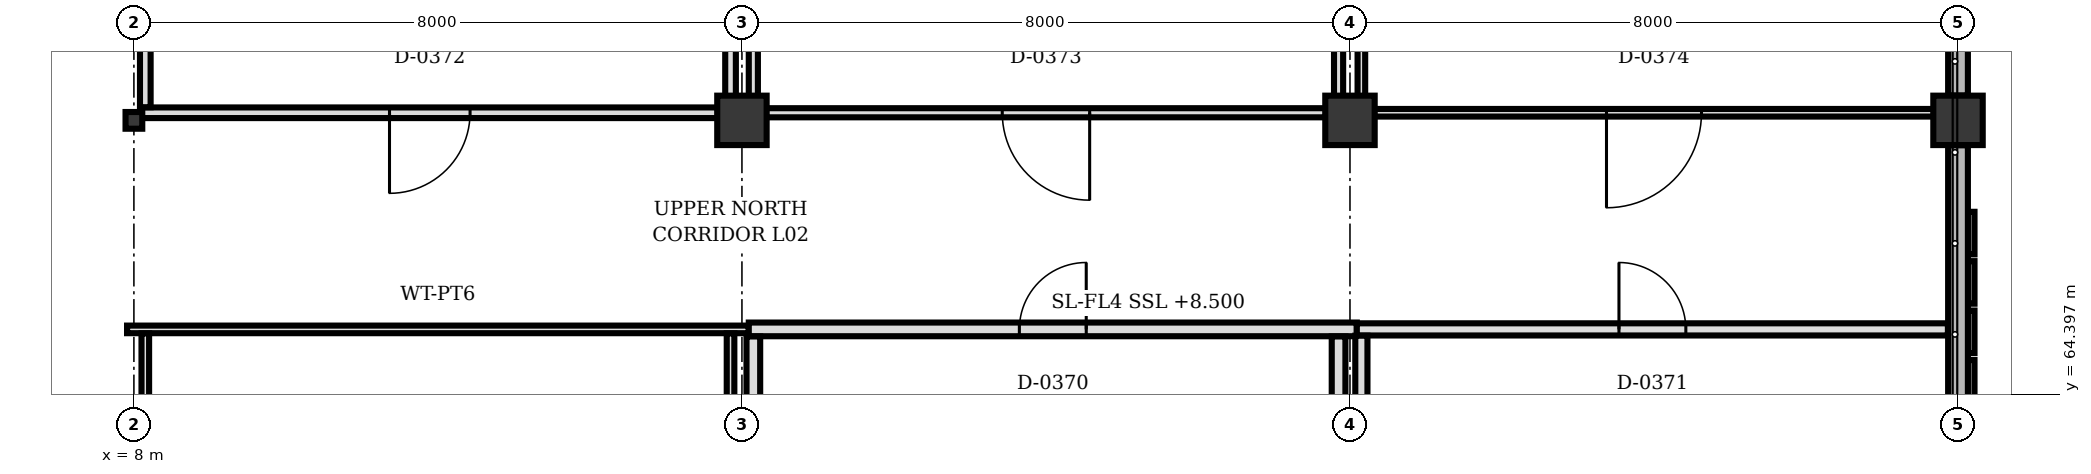
"""IFC4 building model, lengths in metres.
Left out: names, types, materials, properties, quantities, classifications, styles, units other than length and angle.
Written with IfcOpenShell. Run it as: python <this file> out.ifc"""

import sys

from ifc_helpers import new_model, si_unit, direction, frame, frame_2d, origin, origin_2d, place, context, subcontext, project, spatial, rectangle, hollow_rectangle, extrude, element, fill, save


model = new_model("IFC4")
c1 = context("Model", 3, precision=1e-05, world=origin(), true_north=direction((0.0, 1.0)))
c2 = subcontext(c1, "Body", "Model", "MODEL_VIEW")
j1 = project(units=[si_unit("LENGTHUNIT", "METRE"), si_unit("PLANEANGLEUNIT", "RADIAN")], contexts=[c1])
p1 = place(None, origin())
s1 = spatial("IfcSite", under=j1, at=p1, CompositionType="ELEMENT")
p2 = place(p1, origin())
s2 = spatial("IfcBuilding", under=s1, at=p2, CompositionType="ELEMENT")
p3 = place(p2, frame((0.0, 0.0, 8.5)))
s3 = spatial("IfcBuildingStorey", under=s2, at=p3, CompositionType="ELEMENT", Elevation=8.5)
for number, where, z_axis, x_axis in (
    (1, (16.0, 68.0, 0.0), (0.0, 0.0, 1.0), (1.0, 0.0, 0.0)),
    (2, (24.0, 68.0, 0.0), (0.0, 0.0, 1.0), (1.0, 0.0, 0.0)),
    (3, (32.0, 68.0, 0.0), (0.0, 0.0, 1.0), (1.0, 0.0, 0.0)),
):
    element("IfcColumn", number, at=place(p3, frame(where, z_axis=z_axis, x_axis=x_axis)), inside=s3, PredefinedType="COLUMN", context=c2, shape_type="SweptSolid", body=[
        extrude(rectangle(XDim=0.65, YDim=0.65, at=origin_2d()), origin(), (0.0, 0.0, 1.0), 4.0),
    ])
p4 = place(p3, frame((8.0, 68.0, 0.0), z_axis=(0.0, 0.0, 1.0), x_axis=(1.0, 0.0, 0.0)))
e4 = element("IfcColumn", 4, at=p4, inside=s3, PredefinedType="COLUMN", context=c2, shape_type="SweptSolid", body=[
    extrude(hollow_rectangle(XDim=0.22, YDim=0.22, WallThickness=0.01, at=origin_2d()), origin(), (0.0, 0.0, 1.0), 4.0),
])
p5 = place(p3, frame((32.0, 75.673, 0.0), z_axis=(0.0, 0.0, 1.0), x_axis=(0.0, -1.0, 0.0)))
e5 = element("IfcWall", 5, at=p5, inside=s3, PredefinedType="SOLIDWALL", context=c2, shape_type="SweptSolid", body=[
    extrude(rectangle(XDim=7.346, YDim=0.26, at=frame_2d((3.673, 0.0))), origin(), (0.0, 0.0, 1.0), 3.152),
])
p6 = place(p5, frame((4.889, 0.0, 0.9)))
e6 = element("IfcOpeningElement", 6, at=p6, cuts=e5, PredefinedType="OPENING", context=c2, shape_type="SweptSolid", body=[
    extrude(rectangle(XDim=0.8, YDim=1.1, at=frame_2d((0.4, 0.55))), frame((0.0, 0.14, 0.0), z_axis=(0.0, -1.0, 0.0), x_axis=(1.0, 0.0, 0.0)), (0.0, 0.0, 1.0), 0.28),
])
p7 = place(p3, frame((32.0, 67.673, 0.0), z_axis=(0.0, 0.0, 1.0), x_axis=(0.0, -1.0, 0.0)))
e7 = element("IfcWall", 7, at=p7, inside=s3, PredefinedType="SOLIDWALL", context=c2, shape_type="SweptSolid", body=[
    extrude(rectangle(XDim=5.561, YDim=0.26, at=frame_2d((2.781, 0.0))), origin(), (0.0, 0.0, 1.0), 3.002),
])
p8 = place(p3, frame((7.91, 65.25, 0.0), z_axis=(0.0, 0.0, 1.0), x_axis=(1.0, 0.0, 0.0)))
e8 = element("IfcWall", 8, at=p8, inside=s3, PredefinedType="PARTITIONING", context=c2, shape_type="SweptSolid", body=[
    extrude(rectangle(XDim=8.18, YDim=0.1, at=frame_2d((4.09, 0.0))), origin(), (0.0, 0.0, 1.0), 3.152),
])
p9 = place(p3, frame((15.85, 65.197, 0.0), z_axis=(0.0, 0.0, 1.0), x_axis=(0.0, -1.0, 0.0)))
e9 = element("IfcWall", 9, at=p9, inside=s3, PredefinedType="PARTITIONING", context=c2, shape_type="SweptSolid", body=[
    extrude(rectangle(XDim=2.88, YDim=0.1, at=frame_2d((1.44, 0.0))), origin(), (0.0, 0.0, 1.0), 3.002),
])
p10 = place(p3, frame((8.15, 58.26, 0.0), z_axis=(0.0, 0.0, 1.0), x_axis=(0.0, 1.0, 0.0)))
e10 = element("IfcWall", 10, at=p10, inside=s3, PredefinedType="PARTITIONING", context=c2, shape_type="SweptSolid", body=[
    extrude(rectangle(XDim=6.937, YDim=0.1, at=frame_2d((3.469, 0.0))), origin(), (0.0, 0.0, 1.0), 3.002),
])
p11 = place(p10, frame((2.474, 0.0, 0.0)))
e11 = element("IfcOpeningElement", 11, at=p11, cuts=e10, PredefinedType="OPENING", context=c2, shape_type="SweptSolid", body=[
    extrude(rectangle(XDim=0.88, YDim=2.1, at=frame_2d((0.44, 1.05))), frame((0.0, 0.06, 0.0), z_axis=(0.0, -1.0, 0.0), x_axis=(1.0, 0.0, 0.0)), (0.0, 0.0, 1.0), 0.12),
])
p12 = place(p3, frame((16.09, 65.25, 0.0), z_axis=(0.0, 0.0, 1.0), x_axis=(1.0, 0.0, 0.0)))
e12 = element("IfcWall", 12, at=p12, inside=s3, PredefinedType="PARTITIONING", context=c2, shape_type="SweptSolid", body=[
    extrude(rectangle(XDim=8.0, YDim=0.18, at=frame_2d((4.0, 0.0))), origin(), (0.0, 0.0, 1.0), 3.152),
])
p13 = place(p12, frame((3.56, 0.0, 0.0)))
e13 = element("IfcOpeningElement", 13, at=p13, cuts=e12, PredefinedType="OPENING", context=c2, shape_type="SweptSolid", body=[
    extrude(rectangle(XDim=0.88, YDim=2.1, at=frame_2d((0.44, 1.05))), frame((0.0, 0.1, 0.0), z_axis=(0.0, -1.0, 0.0), x_axis=(1.0, 0.0, 0.0)), (0.0, 0.0, 1.0), 0.2),
])
for number, where, z_axis, x_axis in (
    (14, (23.85, 65.157, 0.0), (0.0, 0.0, 1.0), (0.0, -1.0, 0.0)),
    (15, (16.15, 62.317, 0.0), (0.0, 0.0, 1.0), (0.0, 1.0, 0.0)),
):
    element("IfcWall", number, at=place(p3, frame(where, z_axis=z_axis, x_axis=x_axis)), inside=s3, PredefinedType="PARTITIONING", context=c2, shape_type="SweptSolid", body=[
        extrude(rectangle(XDim=2.84, YDim=0.18, at=frame_2d((1.42, 0.0))), origin(), (0.0, 0.0, 1.0), 3.002),
    ])
p14 = place(p3, frame((24.09, 65.25, 0.0), z_axis=(0.0, 0.0, 1.0), x_axis=(1.0, 0.0, 0.0)))
e16 = element("IfcWall", 16, at=p14, inside=s3, PredefinedType="PARTITIONING", context=c2, shape_type="SweptSolid", body=[
    extrude(rectangle(XDim=7.777, YDim=0.16, at=frame_2d((3.888, 0.0))), origin(), (0.0, 0.0, 1.0), 3.152),
])
p15 = place(p14, frame((3.449, 0.0, 0.0)))
e17 = element("IfcOpeningElement", 17, at=p15, cuts=e16, PredefinedType="OPENING", context=c2, shape_type="SweptSolid", body=[
    extrude(rectangle(XDim=0.88, YDim=2.1, at=frame_2d((0.44, 1.05))), frame((0.0, 0.09, 0.0), z_axis=(0.0, -1.0, 0.0), x_axis=(1.0, 0.0, 0.0)), (0.0, 0.0, 1.0), 0.18),
])
p16 = place(p3, frame((24.15, 62.317, 0.0), z_axis=(0.0, 0.0, 1.0), x_axis=(0.0, 1.0, 0.0)))
e18 = element("IfcWall", 18, at=p16, inside=s3, PredefinedType="PARTITIONING", context=c2, shape_type="SweptSolid", body=[
    extrude(rectangle(XDim=2.85, YDim=0.16, at=frame_2d((1.425, 0.0))), origin(), (0.0, 0.0, 1.0), 3.002),
])
p17 = place(p3, frame((15.85, 75.683, 0.0), z_axis=(0.0, 0.0, 1.0), x_axis=(0.0, -1.0, 0.0)))
e19 = element("IfcWall", 19, at=p17, inside=s3, PredefinedType="PARTITIONING", context=c2, shape_type="SweptSolid", body=[
    extrude(rectangle(XDim=7.366, YDim=0.14, at=frame_2d((3.683, 0.0))), origin(), (0.0, 0.0, 1.0), 3.002),
])
p18 = place(p3, frame((15.683, 68.1, 0.0), z_axis=(0.0, 0.0, 1.0), x_axis=(-1.0, 0.0, 0.0)))
e20 = element("IfcWall", 20, at=p18, inside=s3, PredefinedType="PARTITIONING", context=c2, shape_type="SweptSolid", body=[
    extrude(rectangle(XDim=7.581, YDim=0.14, at=frame_2d((3.791, 0.0))), origin(), (0.0, 0.0, 1.0), 3.002),
])
p19 = place(p18, frame((3.26, 0.0, 0.0)))
e21 = element("IfcOpeningElement", 21, at=p19, cuts=e20, PredefinedType="OPENING", context=c2, shape_type="SweptSolid", body=[
    extrude(rectangle(XDim=1.06, YDim=2.2, at=frame_2d((0.53, 1.1))), frame((0.0, 0.08, 0.0), z_axis=(0.0, -1.0, 0.0), x_axis=(1.0, 0.0, 0.0)), (0.0, 0.0, 1.0), 0.16),
])
p20 = place(p3, frame((8.15, 68.173, 0.0), z_axis=(0.0, 0.0, 1.0), x_axis=(0.0, 1.0, 0.0)))
e22 = element("IfcWall", 22, at=p20, inside=s3, PredefinedType="PARTITIONING", context=c2, shape_type="SweptSolid", body=[
    extrude(rectangle(XDim=7.51, YDim=0.14, at=frame_2d((3.755, 0.0))), origin(), (0.0, 0.0, 1.0), 3.002),
])
p21 = place(p3, frame((23.85, 75.683, 0.0), z_axis=(0.0, 0.0, 1.0), x_axis=(0.0, -1.0, 0.0)))
e23 = element("IfcWall", 23, at=p21, inside=s3, PredefinedType="PARTITIONING", context=c2, shape_type="SweptSolid", body=[
    extrude(rectangle(XDim=7.366, YDim=0.12, at=frame_2d((3.683, 0.0))), origin(), (0.0, 0.0, 1.0), 3.002),
])
p22 = place(p3, frame((23.683, 68.1, 0.0), z_axis=(0.0, 0.0, 1.0), x_axis=(-1.0, 0.0, 0.0)))
e24 = element("IfcWall", 24, at=p22, inside=s3, PredefinedType="PARTITIONING", context=c2, shape_type="SweptSolid", body=[
    extrude(rectangle(XDim=7.366, YDim=0.12, at=frame_2d((3.683, 0.0))), origin(), (0.0, 0.0, 1.0), 3.002),
])
p23 = place(p22, frame((3.108, 0.0, 0.0)))
e25 = element("IfcOpeningElement", 25, at=p23, cuts=e24, PredefinedType="OPENING", context=c2, shape_type="SweptSolid", body=[
    extrude(rectangle(XDim=1.15, YDim=2.2, at=frame_2d((0.575, 1.1))), frame((0.0, 0.07, 0.0), z_axis=(0.0, -1.0, 0.0), x_axis=(1.0, 0.0, 0.0)), (0.0, 0.0, 1.0), 0.14),
])
p24 = place(p3, frame((16.15, 68.317, 0.0), z_axis=(0.0, 0.0, 1.0), x_axis=(0.0, 1.0, 0.0)))
e26 = element("IfcWall", 26, at=p24, inside=s3, PredefinedType="PARTITIONING", context=c2, shape_type="SweptSolid", body=[
    extrude(rectangle(XDim=7.366, YDim=0.12, at=frame_2d((3.683, 0.0))), origin(), (0.0, 0.0, 1.0), 3.002),
])
p25 = place(p3, frame((31.683, 68.1, 0.0), z_axis=(0.0, 0.0, 1.0), x_axis=(-1.0, 0.0, 0.0)))
e27 = element("IfcWall", 27, at=p25, inside=s3, PredefinedType="PARTITIONING", context=c2, shape_type="SweptSolid", body=[
    extrude(rectangle(XDim=7.366, YDim=0.1, at=frame_2d((3.683, 0.0))), origin(), (0.0, 0.0, 1.0), 3.002),
])
p26 = place(p25, frame((3.058, 0.0, 0.0)))
e28 = element("IfcOpeningElement", 28, at=p26, cuts=e27, PredefinedType="OPENING", context=c2, shape_type="SweptSolid", body=[
    extrude(rectangle(XDim=1.25, YDim=2.2, at=frame_2d((0.625, 1.1))), frame((0.0, 0.06, 0.0), z_axis=(0.0, -1.0, 0.0), x_axis=(1.0, 0.0, 0.0)), (0.0, 0.0, 1.0), 0.12),
])
p27 = place(p3, frame((24.15, 68.317, 0.0), z_axis=(0.0, 0.0, 1.0), x_axis=(0.0, 1.0, 0.0)))
e29 = element("IfcWall", 29, at=p27, inside=s3, PredefinedType="PARTITIONING", context=c2, shape_type="SweptSolid", body=[
    extrude(rectangle(XDim=7.366, YDim=0.1, at=frame_2d((3.683, 0.0))), origin(), (0.0, 0.0, 1.0), 3.002),
])
p28 = place(p13, origin())
e30 = element("IfcDoor", 30, at=p28, inside=s3, OperationType="SINGLE_SWING_RIGHT", PredefinedType="DOOR", context=c2, shape_type="SweptSolid", body=[
    extrude(rectangle(XDim=0.88, YDim=2.1, at=frame_2d((0.44, 1.05))), frame((0.0, 0.025, 0.0), z_axis=(0.0, -1.0, 0.0), x_axis=(1.0, 0.0, 0.0)), (0.0, 0.0, 1.0), 0.05),
])
fill(e13, e30)
p29 = place(p15, origin())
e31 = element("IfcDoor", 31, at=p29, inside=s3, OperationType="SINGLE_SWING_LEFT", PredefinedType="DOOR", context=c2, shape_type="SweptSolid", body=[
    extrude(rectangle(XDim=0.88, YDim=2.1, at=frame_2d((0.44, 1.05))), frame((0.0, 0.025, 0.0), z_axis=(0.0, -1.0, 0.0), x_axis=(1.0, 0.0, 0.0)), (0.0, 0.0, 1.0), 0.05),
])
fill(e17, e31)
p30 = place(p19, origin())
e32 = element("IfcDoor", 32, at=p30, inside=s3, OperationType="SINGLE_SWING_RIGHT", PredefinedType="DOOR", context=c2, shape_type="SweptSolid", body=[
    extrude(rectangle(XDim=1.06, YDim=2.2, at=frame_2d((0.53, 1.1))), frame((0.0, 0.025, 0.0), z_axis=(0.0, -1.0, 0.0), x_axis=(1.0, 0.0, 0.0)), (0.0, 0.0, 1.0), 0.05),
])
fill(e21, e32)
p31 = place(p23, origin())
e33 = element("IfcDoor", 33, at=p31, inside=s3, OperationType="SINGLE_SWING_LEFT", PredefinedType="DOOR", context=c2, shape_type="SweptSolid", body=[
    extrude(rectangle(XDim=1.15, YDim=2.2, at=frame_2d((0.575, 1.1))), frame((0.0, 0.025, 0.0), z_axis=(0.0, -1.0, 0.0), x_axis=(1.0, 0.0, 0.0)), (0.0, 0.0, 1.0), 0.05),
])
fill(e25, e33)
p32 = place(p26, origin())
e34 = element("IfcDoor", 34, at=p32, inside=s3, OperationType="SINGLE_SWING_RIGHT", PredefinedType="DOOR", context=c2, shape_type="SweptSolid", body=[
    extrude(rectangle(XDim=1.25, YDim=2.2, at=frame_2d((0.625, 1.1))), frame((0.0, 0.025, 0.0), z_axis=(0.0, -1.0, 0.0), x_axis=(1.0, 0.0, 0.0)), (0.0, 0.0, 1.0), 0.05),
])
fill(e28, e34)
save(model, sys.argv[1])
